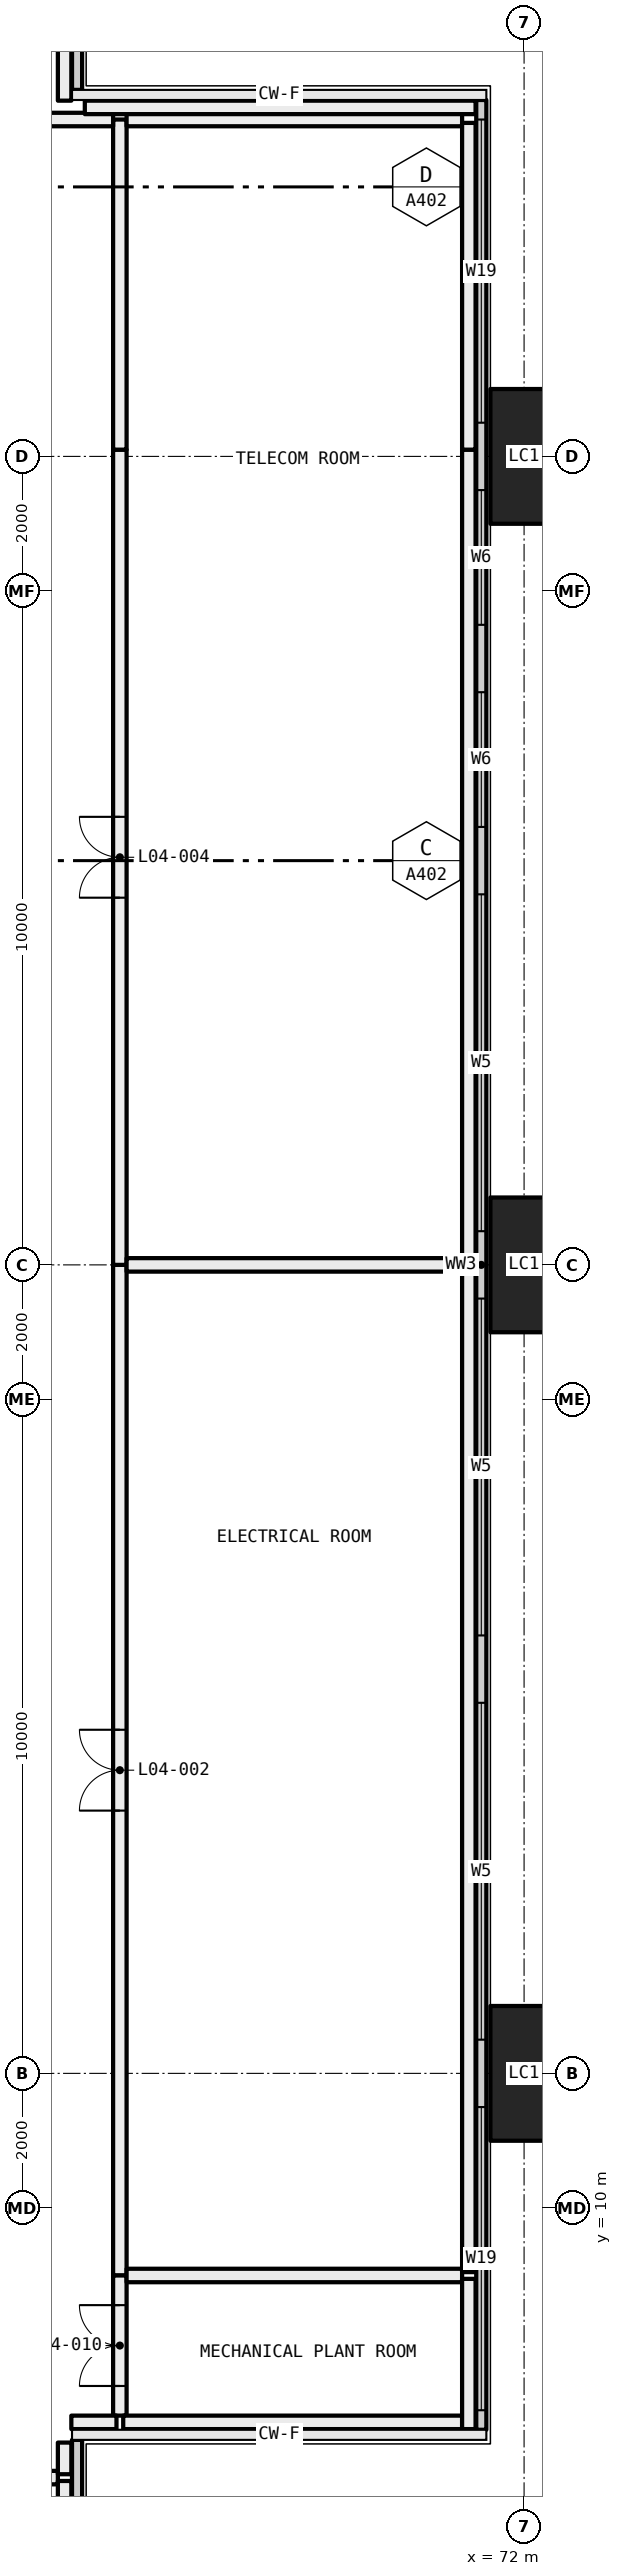
"""IFC4 building model, lengths in metres.
Left out: names, types, materials, properties, quantities, classifications, styles, units other than length and angle.
Written with IfcOpenShell. Run it as: python <this file> out.ifc"""

import sys

from ifc_helpers import new_model, si_unit, direction, frame, frame_2d, origin, origin_2d, place, context, subcontext, project, spatial, rectangle, hollow_rectangle, extrude, element, fill, save


model = new_model("IFC4")
c1 = context("Model", 3, precision=1e-05, world=origin(), true_north=direction((0.0, 1.0)))
c2 = subcontext(c1, "Body", "Model", "MODEL_VIEW")
j1 = project(units=[si_unit("LENGTHUNIT", "METRE"), si_unit("PLANEANGLEUNIT", "RADIAN")], contexts=[c1])
p1 = place(None, origin())
s1 = spatial("IfcSite", under=j1, at=p1, CompositionType="ELEMENT")
p2 = place(p1, origin())
s2 = spatial("IfcBuilding", under=s1, at=p2, CompositionType="ELEMENT")
p3 = place(p2, frame((0.0, 0.0, 24.0)))
s3 = spatial("IfcBuildingStorey", under=s2, at=p3, CompositionType="ELEMENT", Elevation=24.0)
for number, where, z_axis, x_axis in (
    (1, (72.0, 12.0, -0.4), (0.0, 0.0, 1.0), (0.0, 1.0, 0.0)),
    (2, (72.0, 24.0, -0.4), (0.0, 0.0, 1.0), (0.0, 1.0, 0.0)),
    (3, (72.0, 36.0, -0.4), (0.0, 0.0, 1.0), (0.0, 1.0, 0.0)),
):
    element("IfcColumn", number, at=place(p3, frame(where, z_axis=z_axis, x_axis=x_axis)), inside=s3, PredefinedType="COLUMN", context=c2, shape_type="SweptSolid", body=[
        extrude(hollow_rectangle(XDim=2.0, YDim=1.0, WallThickness=0.08, at=origin_2d()), origin(), (0.0, 0.0, 1.0), 6.0),
    ])
p4 = place(p3, frame((65.365, 0.71, 0.0), z_axis=(0.0, 0.0, 1.0), x_axis=(0.0, 1.0, 0.0)))
e4 = element("IfcWall", 4, at=p4, inside=s3, PredefinedType="ELEMENTEDWALL", context=c2, shape_type="SweptSolid", body=[
    extrude(rectangle(XDim=5.85, YDim=0.15, at=frame_2d((2.925, 0.0))), origin(), (0.0, 0.0, 1.0), 5.6),
])
p5 = place(p4, frame((0.29, 0.0, 3.0)))
e5 = element("IfcOpeningElement", 5, at=p5, cuts=e4, PredefinedType="OPENING", context=c2, shape_type="SweptSolid", body=[
    extrude(rectangle(XDim=4.0, YDim=2.55, at=frame_2d((2.0, 1.275))), frame((0.0, 0.085, 0.0), z_axis=(0.0, -1.0, 0.0), x_axis=(1.0, 0.0, 0.0)), (0.0, 0.0, 1.0), 0.17),
])
p6 = place(p3, frame((71.365, 6.71, 0.0), z_axis=(0.0, 0.0, 1.0), x_axis=(0.0, 1.0, 0.0)))
e6 = element("IfcWall", 6, at=p6, inside=s3, PredefinedType="ELEMENTEDWALL", context=c2, shape_type="SweptSolid", body=[
    extrude(rectangle(XDim=34.58, YDim=0.15, at=frame_2d((17.29, 0.0))), origin(), (0.0, 0.0, 1.0), 5.6),
])
p7 = place(p6, frame((0.29, 0.0, 3.0)))
e7 = element("IfcOpeningElement", 7, at=p7, cuts=e6, PredefinedType="OPENING", context=c2, shape_type="SweptSolid", body=[
    extrude(rectangle(XDim=4.5, YDim=2.55, at=frame_2d((2.25, 1.275))), frame((0.0, 0.085, 0.0), z_axis=(0.0, -1.0, 0.0), x_axis=(1.0, 0.0, 0.0)), (0.0, 0.0, 1.0), 0.17),
])
p8 = place(p6, frame((5.79, 0.0, 3.0)))
e8 = element("IfcOpeningElement", 8, at=p8, cuts=e6, PredefinedType="OPENING", context=c2, shape_type="SweptSolid", body=[
    extrude(rectangle(XDim=5.0, YDim=2.55, at=frame_2d((2.5, 1.275))), frame((0.0, 0.085, 0.0), z_axis=(0.0, -1.0, 0.0), x_axis=(1.0, 0.0, 0.0)), (0.0, 0.0, 1.0), 0.17),
])
p9 = place(p6, frame((11.79, 0.0, 3.0)))
e9 = element("IfcOpeningElement", 9, at=p9, cuts=e6, PredefinedType="OPENING", context=c2, shape_type="SweptSolid", body=[
    extrude(rectangle(XDim=5.0, YDim=2.55, at=frame_2d((2.5, 1.275))), frame((0.0, 0.085, 0.0), z_axis=(0.0, -1.0, 0.0), x_axis=(1.0, 0.0, 0.0)), (0.0, 0.0, 1.0), 0.17),
])
p10 = place(p6, frame((17.79, 0.0, 3.0)))
e10 = element("IfcOpeningElement", 10, at=p10, cuts=e6, PredefinedType="OPENING", context=c2, shape_type="SweptSolid", body=[
    extrude(rectangle(XDim=5.0, YDim=2.55, at=frame_2d((2.5, 1.275))), frame((0.0, 0.085, 0.0), z_axis=(0.0, -1.0, 0.0), x_axis=(1.0, 0.0, 0.0)), (0.0, 0.0, 1.0), 0.17),
])
p11 = place(p6, frame((23.79, 0.0, 3.0)))
e11 = element("IfcOpeningElement", 11, at=p11, cuts=e6, PredefinedType="OPENING", context=c2, shape_type="SweptSolid", body=[
    extrude(rectangle(XDim=2.0, YDim=2.55, at=frame_2d((1.0, 1.275))), frame((0.0, 0.085, 0.0), z_axis=(0.0, -1.0, 0.0), x_axis=(1.0, 0.0, 0.0)), (0.0, 0.0, 1.0), 0.17),
])
p12 = place(p6, frame((26.79, 0.0, 3.0)))
e12 = element("IfcOpeningElement", 12, at=p12, cuts=e6, PredefinedType="OPENING", context=c2, shape_type="SweptSolid", body=[
    extrude(rectangle(XDim=2.0, YDim=2.55, at=frame_2d((1.0, 1.275))), frame((0.0, 0.085, 0.0), z_axis=(0.0, -1.0, 0.0), x_axis=(1.0, 0.0, 0.0)), (0.0, 0.0, 1.0), 0.17),
])
p13 = place(p6, frame((29.79, 0.0, 3.0)))
e13 = element("IfcOpeningElement", 13, at=p13, cuts=e6, PredefinedType="OPENING", context=c2, shape_type="SweptSolid", body=[
    extrude(rectangle(XDim=4.5, YDim=2.55, at=frame_2d((2.25, 1.275))), frame((0.0, 0.085, 0.0), z_axis=(0.0, -1.0, 0.0), x_axis=(1.0, 0.0, 0.0)), (0.0, 0.0, 1.0), 0.17),
])
p14 = place(p3, frame((65.365, 41.44, 0.0), z_axis=(0.0, 0.0, 1.0), x_axis=(0.0, 1.0, 0.0)))
e14 = element("IfcWall", 14, at=p14, inside=s3, PredefinedType="ELEMENTEDWALL", context=c2, shape_type="SweptSolid", body=[
    extrude(rectangle(XDim=5.85, YDim=0.15, at=frame_2d((2.925, 0.0))), origin(), (0.0, 0.0, 1.0), 5.6),
])
p15 = place(p14, frame((1.56, 0.0, 3.0)))
e15 = element("IfcOpeningElement", 15, at=p15, cuts=e14, PredefinedType="OPENING", context=c2, shape_type="SweptSolid", body=[
    extrude(rectangle(XDim=4.0, YDim=2.55, at=frame_2d((2.0, 1.275))), frame((0.0, 0.085, 0.0), z_axis=(0.0, -1.0, 0.0), x_axis=(1.0, 0.0, 0.0)), (0.0, 0.0, 1.0), 0.17),
])
p16 = place(p3, frame((66.0, 9.0, 0.0), z_axis=(0.0, 0.0, 1.0), x_axis=(0.0, 1.0, 0.0)))
e16 = element("IfcWall", 16, at=p16, inside=s3, PredefinedType="PARTITIONING", context=c2, shape_type="SweptSolid", body=[
    extrude(rectangle(XDim=15.0, YDim=0.2, at=frame_2d((7.5, 0.0))), origin(), (0.0, 0.0, 1.0), 5.0),
])
p17 = place(p16, frame((6.9, 0.0, 0.0)))
e17 = element("IfcOpeningElement", 17, at=p17, cuts=e16, PredefinedType="OPENING", context=c2, shape_type="SweptSolid", body=[
    extrude(rectangle(XDim=1.2, YDim=2.1, at=frame_2d((0.6, 1.05))), frame((0.0, 0.11, 0.0), z_axis=(0.0, -1.0, 0.0), x_axis=(1.0, 0.0, 0.0)), (0.0, 0.0, 1.0), 0.22),
])
p18 = place(p3, frame((66.0, 24.0, 0.0), z_axis=(0.0, 0.0, 1.0), x_axis=(0.0, 1.0, 0.0)))
e18 = element("IfcWall", 18, at=p18, inside=s3, PredefinedType="PARTITIONING", context=c2, shape_type="SweptSolid", body=[
    extrude(rectangle(XDim=12.1, YDim=0.2, at=frame_2d((6.05, 0.0))), origin(), (0.0, 0.0, 1.0), 5.0),
])
p19 = place(p18, frame((5.45, 0.0, 0.0)))
e19 = element("IfcOpeningElement", 19, at=p19, cuts=e18, PredefinedType="OPENING", context=c2, shape_type="SweptSolid", body=[
    extrude(rectangle(XDim=1.2, YDim=2.1, at=frame_2d((0.6, 1.05))), frame((0.0, 0.11, 0.0), z_axis=(0.0, -1.0, 0.0), x_axis=(1.0, 0.0, 0.0)), (0.0, 0.0, 1.0), 0.22),
])
p20 = place(p3, frame((66.0, 36.1, 0.0), z_axis=(0.0, 0.0, 1.0), x_axis=(0.0, 1.0, 0.0)))
e20 = element("IfcWall", 20, at=p20, inside=s3, PredefinedType="PARTITIONING", context=c2, shape_type="SweptSolid", body=[
    extrude(rectangle(XDim=4.9, YDim=0.2, at=frame_2d((2.45, 0.0))), origin(), (0.0, 0.0, 1.0), 5.6),
])
p21 = place(p3, frame((63.7, 6.0, 0.0), z_axis=(0.0, 0.0, 1.0), x_axis=(1.0, 0.0, 0.0)))
e21 = element("IfcWall", 21, at=p21, inside=s3, PredefinedType="PARTITIONING", context=c2, shape_type="SweptSolid", body=[
    extrude(rectangle(XDim=1.38, YDim=0.2, at=frame_2d((0.69, 0.0))), origin(), (0.0, 0.0, 1.0), 5.6),
])
p22 = place(p3, frame((66.0, 6.92, 0.0), z_axis=(0.0, 0.0, 1.0), x_axis=(0.0, 1.0, 0.0)))
e22 = element("IfcWall", 22, at=p22, inside=s3, PredefinedType="PARTITIONING", context=c2, shape_type="SweptSolid", body=[
    extrude(rectangle(XDim=2.08, YDim=0.2, at=frame_2d((1.04, 0.0))), origin(), (0.0, 0.0, 1.0), 5.6),
])
p23 = place(p22, frame((0.44, 0.0, 0.0)))
e23 = element("IfcOpeningElement", 23, at=p23, cuts=e22, PredefinedType="OPENING", context=c2, shape_type="SweptSolid", body=[
    extrude(rectangle(XDim=1.2, YDim=2.1, at=frame_2d((0.6, 1.05))), frame((0.0, 0.11, 0.0), z_axis=(0.0, -1.0, 0.0), x_axis=(1.0, 0.0, 0.0)), (0.0, 0.0, 1.0), 0.22),
])
p24 = place(p3, frame((65.9, 41.0, 0.0), z_axis=(0.0, 0.0, 1.0), x_axis=(-1.0, 0.0, 0.0)))
e24 = element("IfcWall", 24, at=p24, inside=s3, PredefinedType="PARTITIONING", context=c2, shape_type="SweptSolid", body=[
    extrude(rectangle(XDim=5.9, YDim=0.2, at=frame_2d((2.95, 0.0))), origin(), (0.0, 0.0, 1.0), 5.6),
])
p25 = place(p24, frame((2.35, 0.0, 0.0)))
e25 = element("IfcOpeningElement", 25, at=p25, cuts=e24, PredefinedType="OPENING", context=c2, shape_type="SweptSolid", body=[
    extrude(rectangle(XDim=1.2, YDim=2.1, at=frame_2d((0.6, 1.05))), frame((0.0, 0.11, 0.0), z_axis=(0.0, -1.0, 0.0), x_axis=(1.0, 0.0, 0.0)), (0.0, 0.0, 1.0), 0.22),
])
p26 = place(p3, frame((71.08, 24.0, 0.0), z_axis=(0.0, 0.0, 1.0), x_axis=(-1.0, 0.0, 0.0)))
e26 = element("IfcWall", 26, at=p26, inside=s3, PredefinedType="PARTITIONING", context=c2, shape_type="SweptSolid", body=[
    extrude(rectangle(XDim=4.98, YDim=0.2, at=frame_2d((2.49, 0.0))), origin(), (0.0, 0.0, 1.0), 5.0),
])
for number, where, z_axis, x_axis in (
    (27, (66.1, 9.0, 0.0), (0.0, 0.0, 1.0), (1.0, 0.0, 0.0)),
    (28, (71.08, 41.0, 0.0), (0.0, 0.0, 1.0), (-1.0, 0.0, 0.0)),
):
    element("IfcWall", number, at=place(p3, frame(where, z_axis=z_axis, x_axis=x_axis)), inside=s3, PredefinedType="PARTITIONING", context=c2, shape_type="SweptSolid", body=[
        extrude(rectangle(XDim=4.98, YDim=0.2, at=frame_2d((2.49, 0.0))), origin(), (0.0, 0.0, 1.0), 5.6),
    ])
p27 = place(p3, frame((65.18, 6.05, 0.0), z_axis=(0.0, 0.0, 1.0), x_axis=(0.0, 1.0, 0.0)))
e29 = element("IfcWall", 29, at=p27, inside=s3, PredefinedType="PARTITIONING", context=c2, shape_type="SweptSolid", body=[
    extrude(rectangle(XDim=0.47, YDim=0.2, at=frame_2d((0.235, 0.0))), origin(), (0.0, 0.0, 1.0), 5.6),
])
p28 = place(p3, frame((65.28, 6.82, 0.0), z_axis=(0.0, 0.0, 1.0), x_axis=(1.0, 0.0, 0.0)))
e30 = element("IfcWall", 30, at=p28, inside=s3, PredefinedType="PARTITIONING", context=c2, shape_type="SweptSolid", body=[
    extrude(rectangle(XDim=0.67, YDim=0.2, at=frame_2d((0.335, 0.0))), origin(), (0.0, 0.0, 1.0), 5.6),
])
p29 = place(p3, frame((71.18, 9.05, 0.0), z_axis=(0.0, 0.0, 1.0), x_axis=(0.0, 1.0, 0.0)))
e31 = element("IfcWall", 31, at=p29, inside=s3, PredefinedType="PARTITIONING", context=c2, shape_type="SweptSolid", body=[
    extrude(rectangle(XDim=14.9, YDim=0.2, at=frame_2d((7.45, 0.0))), origin(), (0.0, 0.0, 1.0), 5.0),
])
p30 = place(p3, frame((71.18, 24.05, 0.0), z_axis=(0.0, 0.0, 1.0), x_axis=(0.0, 1.0, 0.0)))
e32 = element("IfcWall", 32, at=p30, inside=s3, PredefinedType="PARTITIONING", context=c2, shape_type="SweptSolid", body=[
    extrude(rectangle(XDim=12.05, YDim=0.2, at=frame_2d((6.025, 0.0))), origin(), (0.0, 0.0, 1.0), 5.0),
])
p31 = place(p3, frame((71.18, 36.1, 0.0), z_axis=(0.0, 0.0, 1.0), x_axis=(0.0, 1.0, 0.0)))
e33 = element("IfcWall", 33, at=p31, inside=s3, PredefinedType="PARTITIONING", context=c2, shape_type="SweptSolid", body=[
    extrude(rectangle(XDim=4.85, YDim=0.2, at=frame_2d((2.425, 0.0))), origin(), (0.0, 0.0, 1.0), 5.6),
])
p32 = place(p3, frame((65.18, 0.72, 0.0), z_axis=(0.0, 0.0, 1.0), x_axis=(0.0, 1.0, 0.0)))
e34 = element("IfcWall", 34, at=p32, inside=s3, PredefinedType="PARTITIONING", context=c2, shape_type="SweptSolid", body=[
    extrude(rectangle(XDim=5.23, YDim=0.2, at=frame_2d((2.615, 0.0))), origin(), (0.0, 0.0, 1.0), 5.6),
])
p33 = place(p3, frame((66.05, 6.82, 0.0), z_axis=(0.0, 0.0, 1.0), x_axis=(1.0, 0.0, 0.0)))
e35 = element("IfcWall", 35, at=p33, inside=s3, PredefinedType="PARTITIONING", context=c2, shape_type="SweptSolid", body=[
    extrude(rectangle(XDim=5.03, YDim=0.2, at=frame_2d((2.515, 0.0))), origin(), (0.0, 0.0, 1.0), 5.6),
])
p34 = place(p3, frame((71.18, 6.72, 0.0), z_axis=(0.0, 0.0, 1.0), x_axis=(0.0, 1.0, 0.0)))
e36 = element("IfcWall", 36, at=p34, inside=s3, PredefinedType="PARTITIONING", context=c2, shape_type="SweptSolid", body=[
    extrude(rectangle(XDim=2.23, YDim=0.2, at=frame_2d((1.115, 0.0))), origin(), (0.0, 0.0, 1.0), 5.6),
])
for number, where, z_axis, x_axis in (
    (37, (71.28, 41.18, 0.0), (0.0, 0.0, 1.0), (-1.0, 0.0, 0.0)),
    (38, (65.18, 41.28, 0.0), (0.0, 0.0, 1.0), (0.0, 1.0, 0.0)),
):
    element("IfcWall", number, at=place(p3, frame(where, z_axis=z_axis, x_axis=x_axis)), inside=s3, PredefinedType="PARTITIONING", context=c2, shape_type="SweptSolid", body=[
        extrude(rectangle(XDim=5.8, YDim=0.2, at=frame_2d((2.9, 0.0))), origin(), (0.0, 0.0, 1.0), 5.6),
    ])
p35 = place(p7, origin())
e39 = element("IfcWindow", 39, at=p35, inside=s3, PartitioningType="SINGLE_PANEL", PredefinedType="WINDOW", context=c2, shape_type="SweptSolid", body=[
    extrude(rectangle(XDim=4.5, YDim=2.55, at=frame_2d((2.25, 1.275))), frame((0.0, 0.03, 0.0), z_axis=(0.0, -1.0, 0.0), x_axis=(1.0, 0.0, 0.0)), (0.0, 0.0, 1.0), 0.06),
])
fill(e7, e39)
p36 = place(p8, origin())
e40 = element("IfcWindow", 40, at=p36, inside=s3, PartitioningType="SINGLE_PANEL", PredefinedType="WINDOW", context=c2, shape_type="SweptSolid", body=[
    extrude(rectangle(XDim=5.0, YDim=2.55, at=frame_2d((2.5, 1.275))), frame((0.0, 0.03, 0.0), z_axis=(0.0, -1.0, 0.0), x_axis=(1.0, 0.0, 0.0)), (0.0, 0.0, 1.0), 0.06),
])
fill(e8, e40)
p37 = place(p9, origin())
e41 = element("IfcWindow", 41, at=p37, inside=s3, PartitioningType="SINGLE_PANEL", PredefinedType="WINDOW", context=c2, shape_type="SweptSolid", body=[
    extrude(rectangle(XDim=5.0, YDim=2.55, at=frame_2d((2.5, 1.275))), frame((0.0, 0.03, 0.0), z_axis=(0.0, -1.0, 0.0), x_axis=(1.0, 0.0, 0.0)), (0.0, 0.0, 1.0), 0.06),
])
fill(e9, e41)
p38 = place(p10, origin())
e42 = element("IfcWindow", 42, at=p38, inside=s3, PartitioningType="SINGLE_PANEL", PredefinedType="WINDOW", context=c2, shape_type="SweptSolid", body=[
    extrude(rectangle(XDim=5.0, YDim=2.55, at=frame_2d((2.5, 1.275))), frame((0.0, 0.03, 0.0), z_axis=(0.0, -1.0, 0.0), x_axis=(1.0, 0.0, 0.0)), (0.0, 0.0, 1.0), 0.06),
])
fill(e10, e42)
p39 = place(p11, origin())
e43 = element("IfcWindow", 43, at=p39, inside=s3, PartitioningType="SINGLE_PANEL", PredefinedType="WINDOW", context=c2, shape_type="SweptSolid", body=[
    extrude(rectangle(XDim=2.0, YDim=2.55, at=frame_2d((1.0, 1.275))), frame((0.0, 0.03, 0.0), z_axis=(0.0, -1.0, 0.0), x_axis=(1.0, 0.0, 0.0)), (0.0, 0.0, 1.0), 0.06),
])
fill(e11, e43)
p40 = place(p12, origin())
e44 = element("IfcWindow", 44, at=p40, inside=s3, PartitioningType="SINGLE_PANEL", PredefinedType="WINDOW", context=c2, shape_type="SweptSolid", body=[
    extrude(rectangle(XDim=2.0, YDim=2.55, at=frame_2d((1.0, 1.275))), frame((0.0, 0.03, 0.0), z_axis=(0.0, -1.0, 0.0), x_axis=(1.0, 0.0, 0.0)), (0.0, 0.0, 1.0), 0.06),
])
fill(e12, e44)
p41 = place(p13, origin())
e45 = element("IfcWindow", 45, at=p41, inside=s3, PartitioningType="SINGLE_PANEL", PredefinedType="WINDOW", context=c2, shape_type="SweptSolid", body=[
    extrude(rectangle(XDim=4.5, YDim=2.55, at=frame_2d((2.25, 1.275))), frame((0.0, 0.03, 0.0), z_axis=(0.0, -1.0, 0.0), x_axis=(1.0, 0.0, 0.0)), (0.0, 0.0, 1.0), 0.06),
])
fill(e13, e45)
p42 = place(p17, origin())
e46 = element("IfcDoor", 46, at=p42, inside=s3, OperationType="DOUBLE_DOOR_SINGLE_SWING", PredefinedType="DOOR", context=c2, shape_type="SweptSolid", body=[
    extrude(rectangle(XDim=1.2, YDim=2.1, at=frame_2d((0.6, 1.05))), frame((0.0, 0.025, 0.0), z_axis=(0.0, -1.0, 0.0), x_axis=(1.0, 0.0, 0.0)), (0.0, 0.0, 1.0), 0.05),
])
fill(e17, e46)
p43 = place(p19, origin())
e47 = element("IfcDoor", 47, at=p43, inside=s3, OperationType="DOUBLE_DOOR_SINGLE_SWING", PredefinedType="DOOR", context=c2, shape_type="SweptSolid", body=[
    extrude(rectangle(XDim=1.2, YDim=2.1, at=frame_2d((0.6, 1.05))), frame((0.0, 0.025, 0.0), z_axis=(0.0, -1.0, 0.0), x_axis=(1.0, 0.0, 0.0)), (0.0, 0.0, 1.0), 0.05),
])
fill(e19, e47)
p44 = place(p23, origin())
e48 = element("IfcDoor", 48, at=p44, inside=s3, OperationType="DOUBLE_DOOR_SINGLE_SWING", PredefinedType="DOOR", context=c2, shape_type="SweptSolid", body=[
    extrude(rectangle(XDim=1.2, YDim=2.1, at=frame_2d((0.6, 1.05))), frame((0.0, 0.025, 0.0), z_axis=(0.0, -1.0, 0.0), x_axis=(1.0, 0.0, 0.0)), (0.0, 0.0, 1.0), 0.05),
])
fill(e23, e48)
save(model, sys.argv[1])
